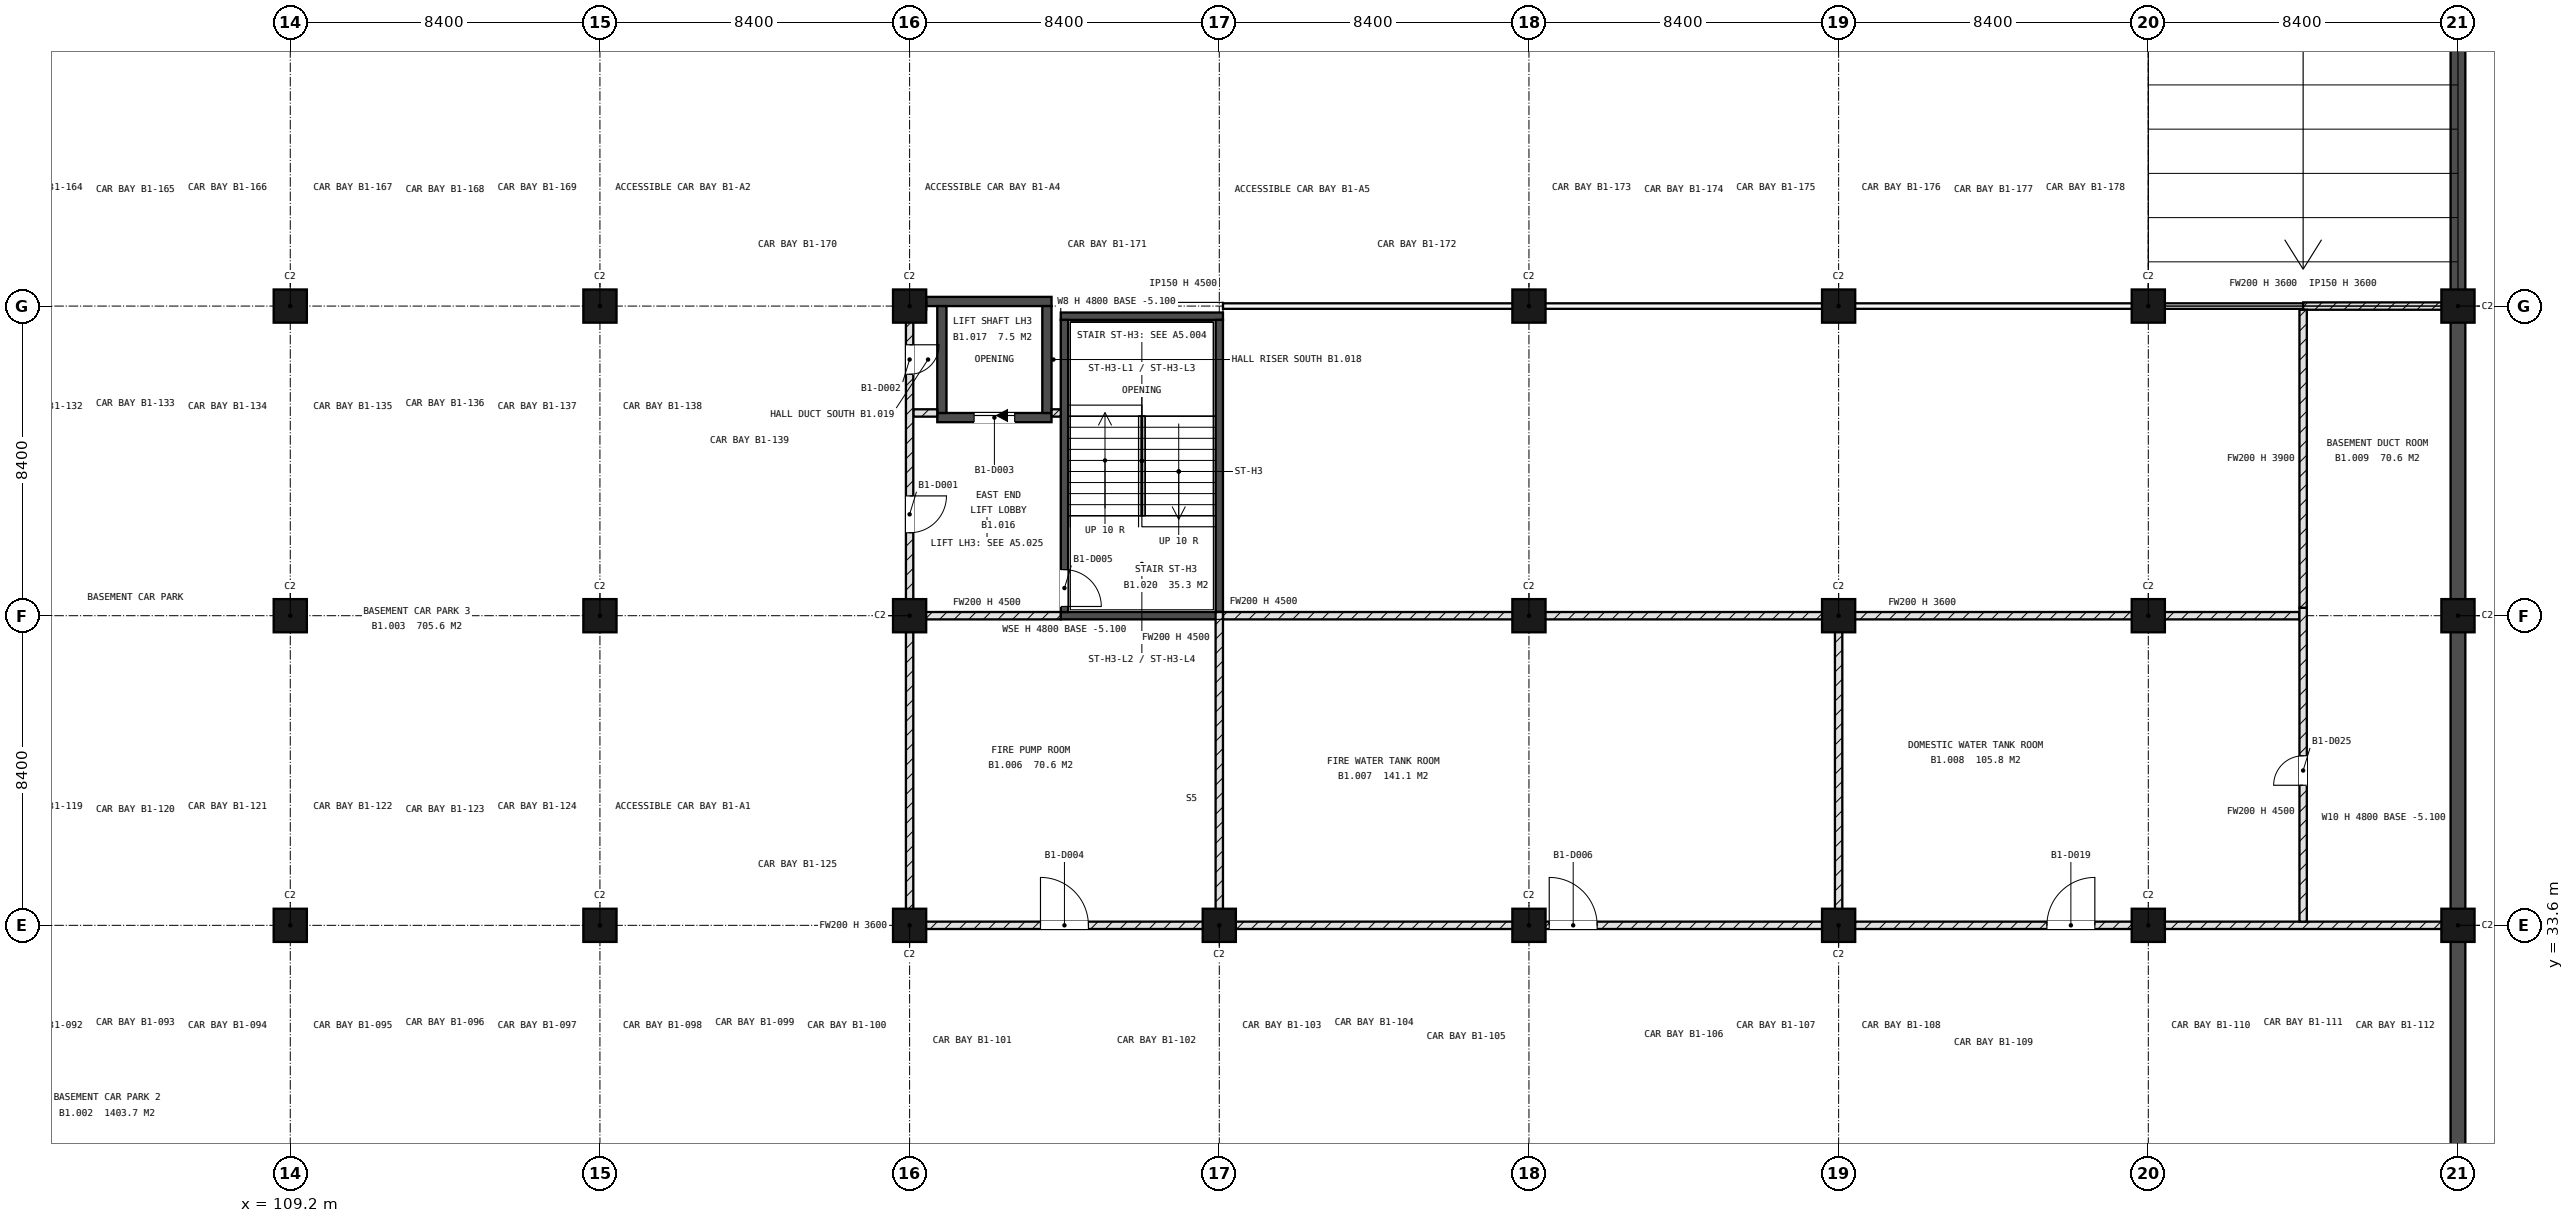
"""IFC4 building model, lengths in metres.
Left out: names, types, materials, properties, quantities, classifications, styles, units other than length and angle.
Written with IfcOpenShell. Run it as: python <this file> out.ifc"""

import sys

from ifc_helpers import new_model, si_unit, direction, frame, frame_2d, origin, origin_2d, place, context, subcontext, project, spatial, rectangle, extrude, element, fill, save


model = new_model("IFC4")
c1 = context("Model", 3, precision=1e-05, world=origin(), true_north=direction((0.0, 1.0)))
c2 = subcontext(c1, "Body", "Model", "MODEL_VIEW")
j1 = project(units=[si_unit("LENGTHUNIT", "METRE"), si_unit("PLANEANGLEUNIT", "RADIAN")], contexts=[c1])
p1 = place(None, origin())
s1 = spatial("IfcSite", under=j1, at=p1, CompositionType="ELEMENT")
p2 = place(p1, origin())
s2 = spatial("IfcBuilding", under=s1, at=p2, CompositionType="ELEMENT")
p3 = place(p2, frame((0.0, 0.0, -4.8)))
s3 = spatial("IfcBuildingStorey", under=s2, at=p3, CompositionType="ELEMENT", Elevation=-4.8)
for number, where, z_axis, x_axis in (
    (1, (109.2, 33.6, -0.3), (0.0, 0.0, 1.0), (1.0, 0.0, 0.0)),
    (2, (109.2, 42.0, -0.3), (0.0, 0.0, 1.0), (1.0, 0.0, 0.0)),
    (3, (109.2, 50.4, -0.3), (0.0, 0.0, 1.0), (1.0, 0.0, 0.0)),
    (4, (117.6, 33.6, -0.3), (0.0, 0.0, 1.0), (1.0, 0.0, 0.0)),
    (5, (117.6, 42.0, -0.3), (0.0, 0.0, 1.0), (1.0, 0.0, 0.0)),
    (6, (117.6, 50.4, -0.3), (0.0, 0.0, 1.0), (1.0, 0.0, 0.0)),
    (7, (126.0, 33.6, -0.3), (0.0, 0.0, 1.0), (1.0, 0.0, 0.0)),
    (8, (126.0, 42.0, -0.3), (0.0, 0.0, 1.0), (1.0, 0.0, 0.0)),
    (9, (126.0, 50.4, -0.3), (0.0, 0.0, 1.0), (1.0, 0.0, 0.0)),
    (10, (134.4, 33.6, -0.3), (0.0, 0.0, 1.0), (1.0, 0.0, 0.0)),
    (11, (142.8, 33.6, -0.3), (0.0, 0.0, 1.0), (1.0, 0.0, 0.0)),
    (12, (142.8, 42.0, -0.3), (0.0, 0.0, 1.0), (1.0, 0.0, 0.0)),
    (13, (142.8, 50.4, -0.3), (0.0, 0.0, 1.0), (1.0, 0.0, 0.0)),
    (14, (151.2, 33.6, -0.3), (0.0, 0.0, 1.0), (1.0, 0.0, 0.0)),
    (15, (151.2, 42.0, -0.3), (0.0, 0.0, 1.0), (1.0, 0.0, 0.0)),
    (16, (151.2, 50.4, -0.3), (0.0, 0.0, 1.0), (1.0, 0.0, 0.0)),
    (17, (159.6, 33.6, -0.3), (0.0, 0.0, 1.0), (1.0, 0.0, 0.0)),
    (18, (159.6, 42.0, -0.3), (0.0, 0.0, 1.0), (1.0, 0.0, 0.0)),
    (19, (159.6, 50.4, -0.3), (0.0, 0.0, 1.0), (1.0, 0.0, 0.0)),
    (20, (168.0, 33.6, -0.3), (0.0, 0.0, 1.0), (1.0, 0.0, 0.0)),
    (21, (168.0, 42.0, -0.3), (0.0, 0.0, 1.0), (1.0, 0.0, 0.0)),
    (22, (168.0, 50.4, -0.3), (0.0, 0.0, 1.0), (1.0, 0.0, 0.0)),
):
    element("IfcColumn", number, at=place(p3, frame(where, z_axis=z_axis, x_axis=x_axis)), inside=s3, PredefinedType="COLUMN", context=c2, shape_type="SweptSolid", body=[
        extrude(rectangle(XDim=0.9, YDim=0.9, at=origin_2d()), origin(), (0.0, 0.0, 1.0), 4.8),
    ])
p4 = place(p3, frame((126.75, 47.375, -0.3), z_axis=(0.0, 0.0, 1.0), x_axis=(1.0, 0.0, 0.0)))
e23 = element("IfcWall", 23, at=p4, inside=s3, PredefinedType="SHEAR", context=c2, shape_type="SweptSolid", body=[
    extrude(rectangle(XDim=3.1, YDim=0.25, at=frame_2d((1.55, 0.0))), origin(), (0.0, 0.0, 1.0), 4.8),
])
p5 = place(p4, frame((1.0, 0.0, 0.3)))
e24 = element("IfcOpeningElement", 24, at=p5, cuts=e23, PredefinedType="OPENING", context=c2, shape_type="SweptSolid", body=[
    extrude(rectangle(XDim=1.1, YDim=2.1, at=frame_2d((0.55, 1.05))), frame((0.0, 0.135, 0.0), z_axis=(0.0, -1.0, 0.0), x_axis=(1.0, 0.0, 0.0)), (0.0, 0.0, 1.0), 0.27),
])
p6 = place(p3, frame((126.45, 50.525, -0.3), z_axis=(0.0, 0.0, 1.0), x_axis=(1.0, 0.0, 0.0)))
e25 = element("IfcWall", 25, at=p6, inside=s3, PredefinedType="SHEAR", context=c2, shape_type="SweptSolid", body=[
    extrude(rectangle(XDim=3.4, YDim=0.25, at=frame_2d((1.7, 0.0))), origin(), (0.0, 0.0, 1.0), 4.8),
])
for number, where, z_axis, x_axis in (
    (26, (126.875, 47.5, -0.3), (0.0, 0.0, 1.0), (0.0, 1.0, 0.0)),
    (27, (129.725, 47.5, -0.3), (0.0, 0.0, 1.0), (0.0, 1.0, 0.0)),
):
    element("IfcWall", number, at=place(p3, frame(where, z_axis=z_axis, x_axis=x_axis)), inside=s3, PredefinedType="SHEAR", context=c2, shape_type="SweptSolid", body=[
        extrude(rectangle(XDim=2.9, YDim=0.25, at=frame_2d((1.45, 0.0))), origin(), (0.0, 0.0, 1.0), 4.8),
    ])
p7 = place(p3, frame((168.0, -0.2, -0.3), z_axis=(0.0, 0.0, 1.0), x_axis=(0.0, 1.0, 0.0)))
e28 = element("IfcWall", 28, at=p7, inside=s3, PredefinedType="SOLIDWALL", context=c2, shape_type="SweptSolid", body=[
    extrude(rectangle(XDim=118.0, YDim=0.4, at=frame_2d((59.0, 0.0))), origin(), (0.0, 0.0, 1.0), 4.8),
])
for number, where, z_axis, x_axis in (
    (29, (130.1, 42.0, -0.3), (0.0, 0.0, 1.0), (1.0, 0.0, 0.0)),
    (30, (130.1, 50.125, -0.3), (0.0, 0.0, 1.0), (1.0, 0.0, 0.0)),
):
    element("IfcWall", number, at=place(p3, frame(where, z_axis=z_axis, x_axis=x_axis)), inside=s3, PredefinedType="SHEAR", context=c2, shape_type="SweptSolid", body=[
        extrude(rectangle(XDim=4.4, YDim=0.2, at=frame_2d((2.2, 0.0))), origin(), (0.0, 0.0, 1.0), 4.8),
    ])
p8 = place(p3, frame((130.2, 42.1, -0.3), z_axis=(0.0, 0.0, 1.0), x_axis=(0.0, 1.0, 0.0)))
e31 = element("IfcWall", 31, at=p8, inside=s3, PredefinedType="SHEAR", context=c2, shape_type="SweptSolid", body=[
    extrude(rectangle(XDim=7.925, YDim=0.2, at=frame_2d((3.962, 0.0))), origin(), (0.0, 0.0, 1.0), 4.8),
])
p9 = place(p8, frame((0.15, 0.0, 0.3)))
e32 = element("IfcOpeningElement", 32, at=p9, cuts=e31, PredefinedType="OPENING", context=c2, shape_type="SweptSolid", body=[
    extrude(rectangle(XDim=1.0, YDim=2.1, at=frame_2d((0.5, 1.05))), frame((0.0, 0.11, 0.0), z_axis=(0.0, -1.0, 0.0), x_axis=(1.0, 0.0, 0.0)), (0.0, 0.0, 1.0), 0.22),
])
p10 = place(p3, frame((134.4, 42.1, -0.3), z_axis=(0.0, 0.0, 1.0), x_axis=(0.0, 1.0, 0.0)))
e33 = element("IfcWall", 33, at=p10, inside=s3, PredefinedType="SHEAR", context=c2, shape_type="SweptSolid", body=[
    extrude(rectangle(XDim=7.925, YDim=0.2, at=frame_2d((3.962, 0.0))), origin(), (0.0, 0.0, 1.0), 4.8),
])
p11 = place(p3, frame((125.9, 33.6, 0.0), z_axis=(0.0, 0.0, 1.0), x_axis=(1.0, 0.0, 0.0)))
e34 = element("IfcWall", 34, at=p11, inside=s3, PredefinedType="SOLIDWALL", context=c2, shape_type="SweptSolid", body=[
    extrude(rectangle(XDim=41.9, YDim=0.2, at=frame_2d((20.95, 0.0))), origin(), (0.0, 0.0, 1.0), 3.6),
])
p12 = place(p11, frame((3.65, 0.0, 0.0)))
e35 = element("IfcOpeningElement", 35, at=p12, cuts=e34, PredefinedType="OPENING", context=c2, shape_type="SweptSolid", body=[
    extrude(rectangle(XDim=1.3, YDim=2.1, at=frame_2d((0.65, 1.05))), frame((0.0, 0.11, 0.0), z_axis=(0.0, -1.0, 0.0), x_axis=(1.0, 0.0, 0.0)), (0.0, 0.0, 1.0), 0.22),
])
p13 = place(p11, frame((17.45, 0.0, 0.0)))
e36 = element("IfcOpeningElement", 36, at=p13, cuts=e34, PredefinedType="OPENING", context=c2, shape_type="SweptSolid", body=[
    extrude(rectangle(XDim=1.3, YDim=2.1, at=frame_2d((0.65, 1.05))), frame((0.0, 0.11, 0.0), z_axis=(0.0, -1.0, 0.0), x_axis=(1.0, 0.0, 0.0)), (0.0, 0.0, 1.0), 0.22),
])
p14 = place(p11, frame((30.95, 0.0, 0.0)))
e37 = element("IfcOpeningElement", 37, at=p14, cuts=e34, PredefinedType="OPENING", context=c2, shape_type="SweptSolid", body=[
    extrude(rectangle(XDim=1.3, YDim=2.1, at=frame_2d((0.65, 1.05))), frame((0.0, 0.11, 0.0), z_axis=(0.0, -1.0, 0.0), x_axis=(1.0, 0.0, 0.0)), (0.0, 0.0, 1.0), 0.22),
])
p15 = place(p3, frame((126.1, 42.0, 0.0), z_axis=(0.0, 0.0, 1.0), x_axis=(1.0, 0.0, 0.0)))
e38 = element("IfcWall", 38, at=p15, inside=s3, PredefinedType="SOLIDWALL", context=c2, shape_type="SweptSolid", body=[
    extrude(rectangle(XDim=4.0, YDim=0.2, at=frame_2d((2.0, 0.0))), origin(), (0.0, 0.0, 1.0), 4.5),
])
p16 = place(p3, frame((134.5, 42.0, 0.0), z_axis=(0.0, 0.0, 1.0), x_axis=(1.0, 0.0, 0.0)))
e39 = element("IfcWall", 39, at=p16, inside=s3, PredefinedType="SOLIDWALL", context=c2, shape_type="SweptSolid", body=[
    extrude(rectangle(XDim=8.73, YDim=0.2, at=frame_2d((4.365, 0.0))), origin(), (0.0, 0.0, 1.0), 4.5),
])
p17 = place(p3, frame((143.23, 42.0, 0.0), z_axis=(0.0, 0.0, 1.0), x_axis=(1.0, 0.0, 0.0)))
e40 = element("IfcWall", 40, at=p17, inside=s3, PredefinedType="SOLIDWALL", context=c2, shape_type="SweptSolid", body=[
    extrude(rectangle(XDim=20.47, YDim=0.2, at=frame_2d((10.235, 0.0))), origin(), (0.0, 0.0, 1.0), 3.6),
])
p18 = place(p3, frame((126.1, 47.5, 0.0), z_axis=(0.0, 0.0, 1.0), x_axis=(1.0, 0.0, 0.0)))
e41 = element("IfcWall", 41, at=p18, inside=s3, PredefinedType="SOLIDWALL", context=c2, shape_type="SweptSolid", body=[
    extrude(rectangle(XDim=0.65, YDim=0.2, at=frame_2d((0.325, 0.0))), origin(), (0.0, 0.0, 1.0), 4.5),
])
p19 = place(p3, frame((129.85, 47.5, 0.0), z_axis=(0.0, 0.0, 1.0), x_axis=(1.0, 0.0, 0.0)))
e42 = element("IfcWall", 42, at=p19, inside=s3, PredefinedType="SOLIDWALL", context=c2, shape_type="SweptSolid", body=[
    extrude(rectangle(XDim=0.25, YDim=0.2, at=frame_2d((0.125, 0.0))), origin(), (0.0, 0.0, 1.0), 4.5),
])
p20 = place(p3, frame((125.9, 50.4, 0.0), z_axis=(0.0, 0.0, 1.0), x_axis=(1.0, 0.0, 0.0)))
e43 = element("IfcWall", 43, at=p20, inside=s3, PredefinedType="SOLIDWALL", context=c2, shape_type="SweptSolid", body=[
    extrude(rectangle(XDim=0.55, YDim=0.2, at=frame_2d((0.275, 0.0))), origin(), (0.0, 0.0, 1.0), 4.5),
])
p21 = place(p3, frame((134.5, 50.4, 0.0), z_axis=(0.0, 0.0, 1.0), x_axis=(1.0, 0.0, 0.0)))
e44 = element("IfcWall", 44, at=p21, inside=s3, PredefinedType="PARTITIONING", context=c2, shape_type="SweptSolid", body=[
    extrude(rectangle(XDim=8.73, YDim=0.15, at=frame_2d((4.365, 0.0))), origin(), (0.0, 0.0, 1.0), 4.5),
])
p22 = place(p3, frame((143.23, 50.4, 0.0), z_axis=(0.0, 0.0, 1.0), x_axis=(1.0, 0.0, 0.0)))
e45 = element("IfcWall", 45, at=p22, inside=s3, PredefinedType="PARTITIONING", context=c2, shape_type="SweptSolid", body=[
    extrude(rectangle(XDim=20.57, YDim=0.15, at=frame_2d((10.285, 0.0))), origin(), (0.0, 0.0, 1.0), 3.6),
])
p23 = place(p3, frame((163.8, 50.4, 0.0), z_axis=(0.0, 0.0, 1.0), x_axis=(1.0, 0.0, 0.0)))
e46 = element("IfcWall", 46, at=p23, inside=s3, PredefinedType="SOLIDWALL", context=c2, shape_type="SweptSolid", body=[
    extrude(rectangle(XDim=4.0, YDim=0.2, at=frame_2d((2.0, 0.0))), origin(), (0.0, 0.0, 1.0), 3.6),
])
p24 = place(p3, frame((126.0, 33.7, 0.0), z_axis=(0.0, 0.0, 1.0), x_axis=(0.0, 1.0, 0.0)))
e47 = element("IfcWall", 47, at=p24, inside=s3, PredefinedType="SOLIDWALL", context=c2, shape_type="SweptSolid", body=[
    extrude(rectangle(XDim=16.6, YDim=0.2, at=frame_2d((8.3, 0.0))), origin(), (0.0, 0.0, 1.0), 3.6),
])
p25 = place(p24, frame((14.85, 0.0, 0.0)))
e48 = element("IfcOpeningElement", 48, at=p25, cuts=e47, PredefinedType="OPENING", context=c2, shape_type="SweptSolid", body=[
    extrude(rectangle(XDim=0.8, YDim=2.1, at=frame_2d((0.4, 1.05))), frame((0.0, 0.11, 0.0), z_axis=(0.0, -1.0, 0.0), x_axis=(1.0, 0.0, 0.0)), (0.0, 0.0, 1.0), 0.22),
])
p26 = place(p24, frame((10.55, 0.0, 0.0)))
e49 = element("IfcOpeningElement", 49, at=p26, cuts=e47, PredefinedType="OPENING", context=c2, shape_type="SweptSolid", body=[
    extrude(rectangle(XDim=1.0, YDim=2.1, at=frame_2d((0.5, 1.05))), frame((0.0, 0.11, 0.0), z_axis=(0.0, -1.0, 0.0), x_axis=(1.0, 0.0, 0.0)), (0.0, 0.0, 1.0), 0.22),
])
p27 = place(p3, frame((134.4, 33.7, 0.0), z_axis=(0.0, 0.0, 1.0), x_axis=(0.0, 1.0, 0.0)))
e50 = element("IfcWall", 50, at=p27, inside=s3, PredefinedType="SOLIDWALL", context=c2, shape_type="SweptSolid", body=[
    extrude(rectangle(XDim=8.4, YDim=0.2, at=frame_2d((4.2, 0.0))), origin(), (0.0, 0.0, 1.0), 4.5),
])
p28 = place(p3, frame((151.2, 33.7, 0.0), z_axis=(0.0, 0.0, 1.0), x_axis=(0.0, 1.0, 0.0)))
e51 = element("IfcWall", 51, at=p28, inside=s3, PredefinedType="SOLIDWALL", context=c2, shape_type="SweptSolid", body=[
    extrude(rectangle(XDim=8.2, YDim=0.2, at=frame_2d((4.1, 0.0))), origin(), (0.0, 0.0, 1.0), 3.6),
])
p29 = place(p3, frame((163.8, 33.7, 0.0), z_axis=(0.0, 0.0, 1.0), x_axis=(0.0, 1.0, 0.0)))
e52 = element("IfcWall", 52, at=p29, inside=s3, PredefinedType="SOLIDWALL", context=c2, shape_type="SweptSolid", body=[
    extrude(rectangle(XDim=8.515, YDim=0.2, at=frame_2d((4.258, 0.0))), origin(), (0.0, 0.0, 1.0), 4.5),
])
p30 = place(p29, frame((3.7, 0.0, 0.0)))
e53 = element("IfcOpeningElement", 53, at=p30, cuts=e52, PredefinedType="OPENING", context=c2, shape_type="SweptSolid", body=[
    extrude(rectangle(XDim=0.8, YDim=2.1, at=frame_2d((0.4, 1.05))), frame((0.0, 0.11, 0.0), z_axis=(0.0, -1.0, 0.0), x_axis=(1.0, 0.0, 0.0)), (0.0, 0.0, 1.0), 0.22),
])
p31 = place(p3, frame((163.8, 42.215, 0.0), z_axis=(0.0, 0.0, 1.0), x_axis=(0.0, 1.0, 0.0)))
e54 = element("IfcWall", 54, at=p31, inside=s3, PredefinedType="SOLIDWALL", context=c2, shape_type="SweptSolid", body=[
    extrude(rectangle(XDim=8.085, YDim=0.2, at=frame_2d((4.042, 0.0))), origin(), (0.0, 0.0, 1.0), 3.9),
])
p32 = place(p5, origin())
e55 = element("IfcDoor", 55, at=p32, inside=s3, OperationType="SLIDING_TO_LEFT", PredefinedType="DOOR", context=c2, shape_type="SweptSolid", body=[
    extrude(rectangle(XDim=1.1, YDim=2.1, at=frame_2d((0.55, 1.05))), frame((0.0, 0.025, 0.0), z_axis=(0.0, -1.0, 0.0), x_axis=(1.0, 0.0, 0.0)), (0.0, 0.0, 1.0), 0.05),
])
fill(e24, e55)
p33 = place(p9, origin())
e56 = element("IfcDoor", 56, at=p33, inside=s3, OperationType="SINGLE_SWING_LEFT", PredefinedType="DOOR", context=c2, shape_type="SweptSolid", body=[
    extrude(rectangle(XDim=1.0, YDim=2.1, at=frame_2d((0.5, 1.05))), frame((0.0, 0.025, 0.0), z_axis=(0.0, -1.0, 0.0), x_axis=(1.0, 0.0, 0.0)), (0.0, 0.0, 1.0), 0.05),
])
fill(e32, e56)
p34 = place(p12, origin())
e57 = element("IfcDoor", 57, at=p34, inside=s3, OperationType="SINGLE_SWING_RIGHT", PredefinedType="DOOR", context=c2, shape_type="SweptSolid", body=[
    extrude(rectangle(XDim=1.3, YDim=2.1, at=frame_2d((0.65, 1.05))), frame((0.0, 0.025, 0.0), z_axis=(0.0, -1.0, 0.0), x_axis=(1.0, 0.0, 0.0)), (0.0, 0.0, 1.0), 0.05),
])
fill(e35, e57)
p35 = place(p13, origin())
e58 = element("IfcDoor", 58, at=p35, inside=s3, OperationType="SINGLE_SWING_RIGHT", PredefinedType="DOOR", context=c2, shape_type="SweptSolid", body=[
    extrude(rectangle(XDim=1.3, YDim=2.1, at=frame_2d((0.65, 1.05))), frame((0.0, 0.025, 0.0), z_axis=(0.0, -1.0, 0.0), x_axis=(1.0, 0.0, 0.0)), (0.0, 0.0, 1.0), 0.05),
])
fill(e36, e58)
p36 = place(p14, origin())
e59 = element("IfcDoor", 59, at=p36, inside=s3, OperationType="SINGLE_SWING_LEFT", PredefinedType="DOOR", context=c2, shape_type="SweptSolid", body=[
    extrude(rectangle(XDim=1.3, YDim=2.1, at=frame_2d((0.65, 1.05))), frame((0.0, 0.025, 0.0), z_axis=(0.0, -1.0, 0.0), x_axis=(1.0, 0.0, 0.0)), (0.0, 0.0, 1.0), 0.05),
])
fill(e37, e59)
p37 = place(p30, origin())
e60 = element("IfcDoor", 60, at=p37, inside=s3, OperationType="SINGLE_SWING_RIGHT", PredefinedType="DOOR", context=c2, shape_type="SweptSolid", body=[
    extrude(rectangle(XDim=0.8, YDim=2.1, at=frame_2d((0.4, 1.05))), frame((0.0, 0.025, 0.0), z_axis=(0.0, -1.0, 0.0), x_axis=(1.0, 0.0, 0.0)), (0.0, 0.0, 1.0), 0.05),
])
fill(e53, e60)
p38 = place(p25, origin())
e61 = element("IfcDoor", 61, at=p38, inside=s3, OperationType="SINGLE_SWING_RIGHT", PredefinedType="DOOR", context=c2, shape_type="SweptSolid", body=[
    extrude(rectangle(XDim=0.8, YDim=2.1, at=frame_2d((0.4, 1.05))), frame((0.0, 0.025, 0.0), z_axis=(0.0, -1.0, 0.0), x_axis=(1.0, 0.0, 0.0)), (0.0, 0.0, 1.0), 0.05),
])
fill(e48, e61)
p39 = place(p26, origin())
e62 = element("IfcDoor", 62, at=p39, inside=s3, OperationType="SINGLE_SWING_RIGHT", PredefinedType="DOOR", context=c2, shape_type="SweptSolid", body=[
    extrude(rectangle(XDim=1.0, YDim=2.1, at=frame_2d((0.5, 1.05))), frame((0.0, 0.025, 0.0), z_axis=(0.0, -1.0, 0.0), x_axis=(1.0, 0.0, 0.0)), (0.0, 0.0, 1.0), 0.05),
])
fill(e49, e62)
save(model, sys.argv[1])
